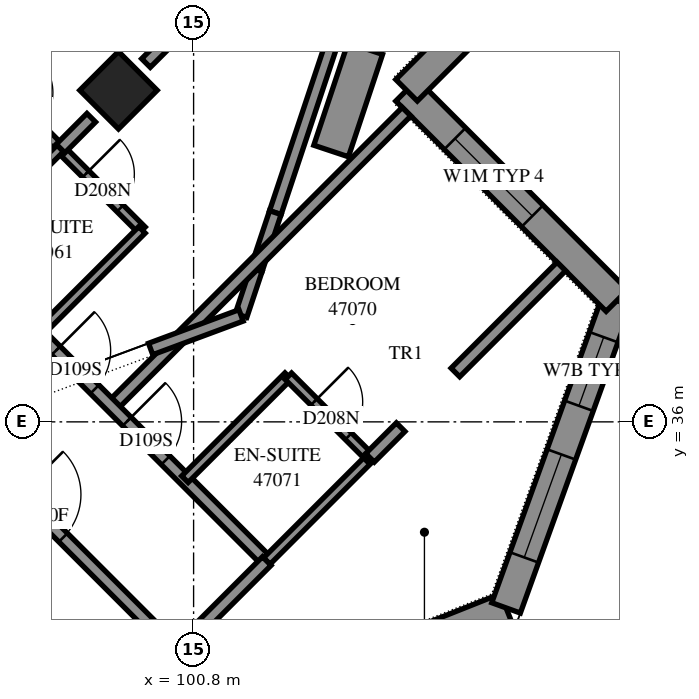
"""IFC4 building model, lengths in metres.
Left out: names, types, materials, properties, quantities, classifications, styles, units other than length and angle.
Written with IfcOpenShell. Run it as: python <this file> out.ifc"""

import sys

from ifc_helpers import new_model, si_unit, direction, frame, frame_2d, origin, origin_2d, place, context, subcontext, project, spatial, polyline, rectangle, outline, extrude, element, fill, save


model = new_model("IFC4")
c1 = context("Model", 3, precision=1e-05, world=origin(), true_north=direction((0.0, 1.0)))
c2 = subcontext(c1, "Body", "Model", "MODEL_VIEW")
j1 = project(units=[si_unit("LENGTHUNIT", "METRE"), si_unit("PLANEANGLEUNIT", "RADIAN")], contexts=[c1])
p1 = place(None, origin())
s1 = spatial("IfcSite", under=j1, at=p1, CompositionType="ELEMENT")
p2 = place(p1, origin())
s2 = spatial("IfcBuilding", under=s1, at=p2, CompositionType="ELEMENT")
p3 = place(p2, frame((0.0, 0.0, 172.8)))
s3 = spatial("IfcBuildingStorey", under=s2, at=p3, CompositionType="ELEMENT", Elevation=172.8)
p4 = place(p3, frame((99.565, 41.453, 0.0), z_axis=(0.0, 0.0, 1.0), x_axis=(0.7071067812, -0.7071067812, 0.0)))
e1 = element("IfcColumn", 1, at=p4, inside=s3, PredefinedType="COLUMN", context=c2, shape_type="SweptSolid", body=[
    extrude(rectangle(XDim=0.9, YDim=0.9, at=origin_2d()), origin(), (0.0, 0.0, 1.0), 3.1),
])
p5 = place(p3, frame((100.776, 30.887, 0.0), z_axis=(0.0, 0.0, 1.0), x_axis=(0.9291503682, 0.3697020331, 0.0)))
e2 = element("IfcWall", 2, at=p5, inside=s3, PredefinedType="SOLIDWALL", context=c2, shape_type="SweptSolid", body=[
    extrude(outline(polyline([(0.108, -0.25), (5.669, -0.25), (5.444, 0.25), (-0.108, 0.25), (0.108, -0.25)])), origin(), (0.0, 0.0, 1.0), 3.1),
])
p6 = place(p5, frame((1.15, 0.0, 0.7)))
e3 = element("IfcOpeningElement", 3, at=p6, cuts=e2, PredefinedType="OPENING", context=c2, shape_type="SweptSolid", body=[
    extrude(rectangle(XDim=1.8, YDim=2.1, at=frame_2d((0.9, 1.05))), frame((0.0, 0.26, 0.0), z_axis=(0.0, -1.0, 0.0), x_axis=(1.0, 0.0, 0.0)), (0.0, 0.0, 1.0), 0.52),
])
p7 = place(p3, frame((105.939, 32.941, 0.0), z_axis=(0.0, 0.0, 1.0), x_axis=(0.3392592753, 0.9406929064, 0.0)))
e4 = element("IfcWall", 4, at=p7, inside=s3, PredefinedType="SOLIDWALL", context=c2, shape_type="SweptSolid", body=[
    extrude(outline(polyline([(-0.113, -0.25), (5.531, -0.25), (5.213, 0.25), (0.113, 0.25), (-0.113, -0.25)])), origin(), (0.0, 0.0, 1.0), 3.1),
])
p8 = place(p7, frame((0.882, 0.0, 0.7)))
e5 = element("IfcOpeningElement", 5, at=p8, cuts=e4, PredefinedType="OPENING", context=c2, shape_type="SweptSolid", body=[
    extrude(rectangle(XDim=1.8, YDim=2.1, at=frame_2d((0.9, 1.05))), frame((0.0, 0.26, 0.0), z_axis=(0.0, -1.0, 0.0), x_axis=(1.0, 0.0, 0.0)), (0.0, 0.0, 1.0), 0.52),
])
p9 = place(p7, frame((3.533, 0.0, 0.7)))
e6 = element("IfcOpeningElement", 6, at=p9, cuts=e4, PredefinedType="OPENING", context=c2, shape_type="SweptSolid", body=[
    extrude(rectangle(XDim=1.2, YDim=2.1, at=frame_2d((0.6, 1.05))), frame((0.0, 0.26, 0.0), z_axis=(0.0, -1.0, 0.0), x_axis=(1.0, 0.0, 0.0)), (0.0, 0.0, 1.0), 0.52),
])
p10 = place(p3, frame((107.761, 37.994, 0.0), z_axis=(0.0, 0.0, 1.0), x_axis=(-0.7071272252, 0.7070863366, 0.0)))
e7 = element("IfcWall", 7, at=p10, inside=s3, PredefinedType="SOLIDWALL", context=c2, shape_type="SweptSolid", body=[
    extrude(outline(polyline([(-0.159, -0.25), (4.641, -0.25), (5.141, 0.25), (0.159, 0.25), (-0.159, -0.25)])), origin(), (0.0, 0.0, 1.0), 3.1),
])
p11 = place(p10, frame((1.966, 0.0, 0.7)))
e8 = element("IfcOpeningElement", 8, at=p11, cuts=e7, PredefinedType="OPENING", context=c2, shape_type="SweptSolid", body=[
    extrude(rectangle(XDim=1.8, YDim=1.8, at=frame_2d((0.9, 0.9))), frame((0.0, 0.26, 0.0), z_axis=(0.0, -1.0, 0.0), x_axis=(1.0, 0.0, 0.0)), (0.0, 0.0, 1.0), 0.52),
])
p12 = place(p3, frame((104.302, 41.453, 0.0), z_axis=(0.0, 0.0, 1.0), x_axis=(0.7071152225, 0.7070983398, 0.0)))
e9 = element("IfcWall", 9, at=p12, inside=s3, PredefinedType="SOLIDWALL", context=c2, shape_type="SweptSolid", body=[
    extrude(outline(polyline([(0.25, -0.25), (6.28, -0.25), (5.566, 0.25), (-0.25, 0.25), (0.25, -0.25)])), origin(), (0.0, 0.0, 1.0), 3.1),
])
p13 = place(p12, frame((1.125, 0.0, 0.7)))
e10 = element("IfcOpeningElement", 10, at=p13, cuts=e9, PredefinedType="OPENING", context=c2, shape_type="SweptSolid", body=[
    extrude(rectangle(XDim=1.8, YDim=1.8, at=frame_2d((0.9, 0.9))), frame((0.0, 0.26, 0.0), z_axis=(0.0, -1.0, 0.0), x_axis=(1.0, 0.0, 0.0)), (0.0, 0.0, 1.0), 0.52),
])
p14 = place(p3, frame((103.291, 42.881, 0.0), z_axis=(0.0, 0.0, 1.0), x_axis=(-0.3162443117, -0.9486777827, 0.0)))
e11 = element("IfcWall", 11, at=p14, inside=s3, PredefinedType="PARAPET", context=c2, shape_type="SweptSolid", body=[
    extrude(outline(polyline([(0.0, -0.1), (3.626, -0.1), (3.626, 0.1), (0.0, 0.1), (0.0, -0.1)])), origin(), (0.0, 0.0, 1.0), 0.25),
])
p15 = place(p3, frame((102.144, 39.441, 0.0), z_axis=(0.0, 0.0, 1.0), x_axis=(-0.3161671582, -0.9487034985, 0.0)))
e12 = element("IfcWall", 12, at=p15, inside=s3, PredefinedType="PARAPET", context=c2, shape_type="SweptSolid", body=[
    extrude(outline(polyline([(0.0, -0.1), (0.99, -0.1), (0.99, 0.1), (0.0, 0.1), (0.0, -0.1)])), origin(), (0.0, 0.0, 1.0), 0.25),
])
p16 = place(p3, frame((101.831, 38.502, 0.0), z_axis=(0.0, 0.0, 1.0), x_axis=(-0.3163035263, -0.9486580413, 0.0)))
e13 = element("IfcWall", 13, at=p16, inside=s3, PredefinedType="PARAPET", context=c2, shape_type="SweptSolid", body=[
    extrude(outline(polyline([(0.0, -0.1), (0.744, -0.1), (0.84, 0.1), (0.0, 0.1), (0.0, -0.1)])), origin(), (0.0, 0.0, 1.0), 0.25),
])
p17 = place(p3, frame((103.623, 42.138, 0.0), z_axis=(0.0, 0.0, 1.0), x_axis=(-0.3162446684, -0.9486776638, 0.0)))
e14 = element("IfcWall", 14, at=p17, inside=s3, PredefinedType="SOLIDWALL", context=c2, shape_type="SweptSolid", body=[
    extrude(rectangle(XDim=1.775, YDim=0.6, at=frame_2d((0.887, 0.0))), origin(), (0.0, 0.0, 1.0), 0.65),
])
p18 = place(p3, frame((94.366, 41.348, 0.0), z_axis=(0.0, 0.0, 1.0), x_axis=(0.7071108825, 0.7071026798, 0.0)))
e15 = element("IfcWall", 15, at=p18, inside=s3, PredefinedType="PARTITIONING", context=c2, shape_type="SweptSolid", body=[
    extrude(rectangle(XDim=12.191, YDim=0.2, at=frame_2d((6.096, 0.0))), origin(), (0.0, 0.0, 1.0), 3.1),
])
p19 = place(p3, frame((91.967, 40.785, 0.0), z_axis=(0.0, 0.0, 1.0), x_axis=(0.7071067812, -0.7071067812, 0.0)))
e16 = element("IfcWall", 16, at=p19, inside=s3, PredefinedType="PARTITIONING", context=c2, shape_type="SweptSolid", body=[
    extrude(rectangle(XDim=12.1, YDim=0.2, at=frame_2d((6.05, 0.0))), origin(), (0.0, 0.0, 1.0), 3.1),
])
p20 = place(p19, frame((3.448, 0.0, 0.0)))
e17 = element("IfcOpeningElement", 17, at=p20, cuts=e16, PredefinedType="OPENING", context=c2, shape_type="SweptSolid", body=[
    extrude(rectangle(XDim=0.9, YDim=2.1, at=frame_2d((0.45, 1.05))), frame((0.0, 0.11, 0.0), z_axis=(0.0, -1.0, 0.0), x_axis=(1.0, 0.0, 0.0)), (0.0, 0.0, 1.0), 0.22),
])
p21 = place(p19, frame((8.457, 0.0, 0.0)))
e18 = element("IfcOpeningElement", 18, at=p21, cuts=e16, PredefinedType="OPENING", context=c2, shape_type="SweptSolid", body=[
    extrude(rectangle(XDim=1.0, YDim=2.1, at=frame_2d((0.5, 1.05))), frame((0.0, 0.11, 0.0), z_axis=(0.0, -1.0, 0.0), x_axis=(1.0, 0.0, 0.0)), (0.0, 0.0, 1.0), 0.22),
])
p22 = place(p3, frame((99.458, 36.256, 0.0), z_axis=(0.0, 0.0, 1.0), x_axis=(0.7071067812, 0.7071067812, 0.0)))
e19 = element("IfcWall", 19, at=p22, inside=s3, PredefinedType="PARTITIONING", context=c2, shape_type="SweptSolid", body=[
    extrude(rectangle(XDim=6.85, YDim=0.2, at=frame_2d((3.425, 0.0))), origin(), (0.0, 0.0, 1.0), 3.1),
])
p23 = place(p3, frame((100.017, 41.901, 0.0), z_axis=(0.0, 0.0, 1.0), x_axis=(0.7072754814, 0.7069380408, 0.0)))
e20 = element("IfcWall", 20, at=p23, inside=s3, PredefinedType="PARTITIONING", context=c2, shape_type="SweptSolid", body=[
    extrude(rectangle(XDim=5.927, YDim=0.2, at=frame_2d((2.963, 0.0))), origin(), (0.0, 0.0, 1.0), 3.1),
])
p24 = place(p3, frame((98.253, 37.455, 0.0), z_axis=(0.0, 0.0, 1.0), x_axis=(0.7071067812, -0.7071067812, 0.0)))
e21 = element("IfcWall", 21, at=p24, inside=s3, PredefinedType="PARTITIONING", context=c2, shape_type="SweptSolid", body=[
    extrude(rectangle(XDim=5.301, YDim=0.2, at=frame_2d((2.65, 0.0))), origin(), (0.0, 0.0, 1.0), 3.1),
])
p25 = place(p24, frame((0.401, 0.0, 0.0)))
e22 = element("IfcOpeningElement", 22, at=p25, cuts=e21, PredefinedType="OPENING", context=c2, shape_type="SweptSolid", body=[
    extrude(rectangle(XDim=0.9, YDim=2.1, at=frame_2d((0.45, 1.05))), frame((0.0, 0.11, 0.0), z_axis=(0.0, -1.0, 0.0), x_axis=(1.0, 0.0, 0.0)), (0.0, 0.0, 1.0), 0.22),
])
p26 = place(p24, frame((2.05, 0.0, 0.0)))
e23 = element("IfcOpeningElement", 23, at=p26, cuts=e21, PredefinedType="OPENING", context=c2, shape_type="SweptSolid", body=[
    extrude(rectangle(XDim=0.9, YDim=2.1, at=frame_2d((0.45, 1.05))), frame((0.0, 0.11, 0.0), z_axis=(0.0, -1.0, 0.0), x_axis=(1.0, 0.0, 0.0)), (0.0, 0.0, 1.0), 0.22),
])
p27 = place(p3, frame((97.263, 41.839, 0.0), z_axis=(0.0, 0.0, 1.0), x_axis=(0.7071067812, -0.7071067812, 0.0)))
e24 = element("IfcWall", 24, at=p27, inside=s3, PredefinedType="PARTITIONING", context=c2, shape_type="SweptSolid", body=[
    extrude(rectangle(XDim=3.801, YDim=0.15, at=frame_2d((1.901, 0.0))), origin(), (0.0, 0.0, 1.0), 3.1),
])
p28 = place(p27, frame((0.598, 0.0, 0.0)))
e25 = element("IfcOpeningElement", 25, at=p28, cuts=e24, PredefinedType="OPENING", context=c2, shape_type="SweptSolid", body=[
    extrude(rectangle(XDim=0.8, YDim=2.1, at=frame_2d((0.4, 1.05))), frame((0.0, 0.085, 0.0), z_axis=(0.0, -1.0, 0.0), x_axis=(1.0, 0.0, 0.0)), (0.0, 0.0, 1.0), 0.17),
])
p29 = place(p27, frame((2.493, 0.0, 0.0)))
e26 = element("IfcOpeningElement", 26, at=p29, cuts=e24, PredefinedType="OPENING", context=c2, shape_type="SweptSolid", body=[
    extrude(rectangle(XDim=0.8, YDim=2.1, at=frame_2d((0.4, 1.05))), frame((0.0, 0.085, 0.0), z_axis=(0.0, -1.0, 0.0), x_axis=(1.0, 0.0, 0.0)), (0.0, 0.0, 1.0), 0.17),
])
p30 = place(p3, frame((105.105, 36.813, 0.0), z_axis=(0.0, 0.0, 1.0), x_axis=(0.7071067812, 0.7071067812, 0.0)))
e27 = element("IfcWall", 27, at=p30, inside=s3, PredefinedType="PARTITIONING", context=c2, shape_type="SweptSolid", body=[
    extrude(rectangle(XDim=2.463, YDim=0.2, at=frame_2d((1.232, 0.0))), origin(), (0.0, 0.0, 1.0), 3.1),
])
p31 = place(p3, frame((102.003, 33.711, 0.0), z_axis=(0.0, 0.0, 1.0), x_axis=(0.7071067812, 0.7071067812, 0.0)))
e28 = element("IfcWall", 28, at=p31, inside=s3, PredefinedType="PARTITIONING", context=c2, shape_type="SweptSolid", body=[
    extrude(rectangle(XDim=2.401, YDim=0.15, at=frame_2d((1.201, 0.0))), origin(), (0.0, 0.0, 1.0), 3.1),
])
for number, where, z_axis, x_axis in (
    (29, (98.253, 37.461, 0.0), (0.0, 0.0, 1.0), (0.708, 0.707, 0.0)),
    (30, (100.657, 35.057, 0.0), (0.0, 0.0, 1.0), (0.708, 0.707, 0.0)),
):
    element("IfcWall", number, at=place(p3, frame(where, z_axis=z_axis, x_axis=x_axis)), inside=s3, PredefinedType="PARTITIONING", context=c2, shape_type="SweptSolid", body=[
        extrude(rectangle(XDim=2.4, YDim=0.15, at=frame_2d((1.2, 0.0))), origin(), (0.0, 0.0, 1.0), 3.1),
    ])
p32 = place(p3, frame((96.913, 38.803, 0.0), z_axis=(0.0, 0.0, 1.0), x_axis=(0.7071067812, 0.7071067812, 0.0)))
e31 = element("IfcWall", 31, at=p32, inside=s3, PredefinedType="PARTITIONING", context=c2, shape_type="SweptSolid", body=[
    extrude(rectangle(XDim=2.398, YDim=0.15, at=frame_2d((1.199, 0.0))), origin(), (0.0, 0.0, 1.0), 2.6),
])
p33 = place(p3, frame((100.519, 32.227, 0.0), z_axis=(0.0, 0.0, 1.0), x_axis=(0.7071067812, 0.7071067812, 0.0)))
e32 = element("IfcWall", 32, at=p33, inside=s3, PredefinedType="PARTITIONING", context=c2, shape_type="SweptSolid", body=[
    extrude(rectangle(XDim=2.099, YDim=0.2, at=frame_2d((1.049, 0.0))), origin(), (0.0, 0.0, 1.0), 3.1),
])
p34 = place(p3, frame((102.358, 36.75, 0.0), z_axis=(0.0, 0.0, 1.0), x_axis=(0.7076330979, -0.7065800724, 0.0)))
e33 = element("IfcWall", 33, at=p34, inside=s3, PredefinedType="PARTITIONING", context=c2, shape_type="SweptSolid", body=[
    extrude(rectangle(XDim=1.899, YDim=0.15, at=frame_2d((0.95, 0.0))), origin(), (0.0, 0.0, 1.0), 3.1),
])
p35 = place(p34, frame((0.597, 0.0, 0.0)))
e34 = element("IfcOpeningElement", 34, at=p35, cuts=e33, PredefinedType="OPENING", context=c2, shape_type="SweptSolid", body=[
    extrude(rectangle(XDim=0.8, YDim=2.1, at=frame_2d((0.4, 1.05))), frame((0.0, 0.085, 0.0), z_axis=(0.0, -1.0, 0.0), x_axis=(1.0, 0.0, 0.0)), (0.0, 0.0, 1.0), 0.17),
])
p36 = place(p3, frame((98.613, 40.495, 0.0), z_axis=(0.0, 0.0, 1.0), x_axis=(0.7057051861, 0.7085056035, 0.0)))
e35 = element("IfcWall", 35, at=p36, inside=s3, PredefinedType="PARTITIONING", context=c2, shape_type="SweptSolid", body=[
    extrude(rectangle(XDim=0.714, YDim=0.2, at=frame_2d((0.357, 0.0))), origin(), (0.0, 0.0, 1.0), 2.6),
])
p37 = place(p3, frame((103.701, 35.409, 0.0), z_axis=(0.0, 0.0, 1.0), x_axis=(0.7071067812, 0.7071067812, 0.0)))
e36 = element("IfcWall", 36, at=p37, inside=s3, PredefinedType="PARTITIONING", context=c2, shape_type="SweptSolid", body=[
    extrude(rectangle(XDim=0.713, YDim=0.2, at=frame_2d((0.356, 0.0))), origin(), (0.0, 0.0, 1.0), 3.1),
])
p38 = place(p3, frame((101.581, 37.751, 0.0), z_axis=(0.0, 0.0, 1.0), x_axis=(-0.9374282115, -0.3481786155, 0.0)))
e37 = element("IfcWall", 37, at=p38, inside=s3, PredefinedType="PARAPET", context=c2, shape_type="SweptSolid", body=[
    extrude(outline(polyline([(0.048, -0.1), (1.586, -0.1), (1.586, 0.1), (-0.048, 0.1), (0.048, -0.1)])), origin(), (0.0, 0.0, 1.0), 0.25),
])
p39 = place(p8, origin())
e38 = element("IfcWindow", 38, at=p39, inside=s3, PartitioningType="SINGLE_PANEL", PredefinedType="WINDOW", context=c2, shape_type="SweptSolid", body=[
    extrude(rectangle(XDim=1.8, YDim=2.1, at=frame_2d((0.9, 1.05))), frame((0.0, 0.18, 0.0), z_axis=(0.0, -1.0, 0.0), x_axis=(1.0, 0.0, 0.0)), (0.0, 0.0, 1.0), 0.06),
])
fill(e5, e38)
p40 = place(p9, origin())
e39 = element("IfcWindow", 39, at=p40, inside=s3, PartitioningType="SINGLE_PANEL", PredefinedType="WINDOW", context=c2, shape_type="SweptSolid", body=[
    extrude(rectangle(XDim=1.2, YDim=2.1, at=frame_2d((0.6, 1.05))), frame((0.0, 0.18, 0.0), z_axis=(0.0, -1.0, 0.0), x_axis=(1.0, 0.0, 0.0)), (0.0, 0.0, 1.0), 0.06),
])
fill(e6, e39)
p41 = place(p11, origin())
e40 = element("IfcWindow", 40, at=p41, inside=s3, PartitioningType="SINGLE_PANEL", PredefinedType="WINDOW", context=c2, shape_type="SweptSolid", body=[
    extrude(rectangle(XDim=1.8, YDim=1.8, at=frame_2d((0.9, 0.9))), frame((0.0, 0.18, 0.0), z_axis=(0.0, -1.0, 0.0), x_axis=(1.0, 0.0, 0.0)), (0.0, 0.0, 1.0), 0.06),
])
fill(e8, e40)
p42 = place(p25, origin())
e41 = element("IfcDoor", 41, at=p42, inside=s3, OperationType="SINGLE_SWING_LEFT", PredefinedType="DOOR", context=c2, shape_type="SweptSolid", body=[
    extrude(rectangle(XDim=0.9, YDim=2.1, at=frame_2d((0.45, 1.05))), frame((0.0, 0.025, 0.0), z_axis=(0.0, -1.0, 0.0), x_axis=(1.0, 0.0, 0.0)), (0.0, 0.0, 1.0), 0.05),
])
fill(e22, e41)
p43 = place(p29, origin())
e42 = element("IfcDoor", 42, at=p43, inside=s3, OperationType="SINGLE_SWING_RIGHT", PredefinedType="DOOR", context=c2, shape_type="SweptSolid", body=[
    extrude(rectangle(XDim=0.8, YDim=2.1, at=frame_2d((0.4, 1.05))), frame((0.0, 0.025, 0.0), z_axis=(0.0, -1.0, 0.0), x_axis=(1.0, 0.0, 0.0)), (0.0, 0.0, 1.0), 0.05),
])
fill(e26, e42)
p44 = place(p21, origin())
e43 = element("IfcDoor", 43, at=p44, inside=s3, OperationType="SINGLE_SWING_RIGHT", PredefinedType="DOOR", context=c2, shape_type="SweptSolid", body=[
    extrude(rectangle(XDim=1.0, YDim=2.1, at=frame_2d((0.5, 1.05))), frame((0.0, 0.025, 0.0), z_axis=(0.0, -1.0, 0.0), x_axis=(1.0, 0.0, 0.0)), (0.0, 0.0, 1.0), 0.05),
])
fill(e18, e43)
p45 = place(p26, origin())
e44 = element("IfcDoor", 44, at=p45, inside=s3, OperationType="SINGLE_SWING_RIGHT", PredefinedType="DOOR", context=c2, shape_type="SweptSolid", body=[
    extrude(rectangle(XDim=0.9, YDim=2.1, at=frame_2d((0.45, 1.05))), frame((0.0, 0.025, 0.0), z_axis=(0.0, -1.0, 0.0), x_axis=(1.0, 0.0, 0.0)), (0.0, 0.0, 1.0), 0.05),
])
fill(e23, e44)
p46 = place(p35, origin())
e45 = element("IfcDoor", 45, at=p46, inside=s3, OperationType="SINGLE_SWING_RIGHT", PredefinedType="DOOR", context=c2, shape_type="SweptSolid", body=[
    extrude(rectangle(XDim=0.8, YDim=2.1, at=frame_2d((0.4, 1.05))), frame((0.0, 0.025, 0.0), z_axis=(0.0, -1.0, 0.0), x_axis=(1.0, 0.0, 0.0)), (0.0, 0.0, 1.0), 0.05),
])
fill(e34, e45)
save(model, sys.argv[1])
